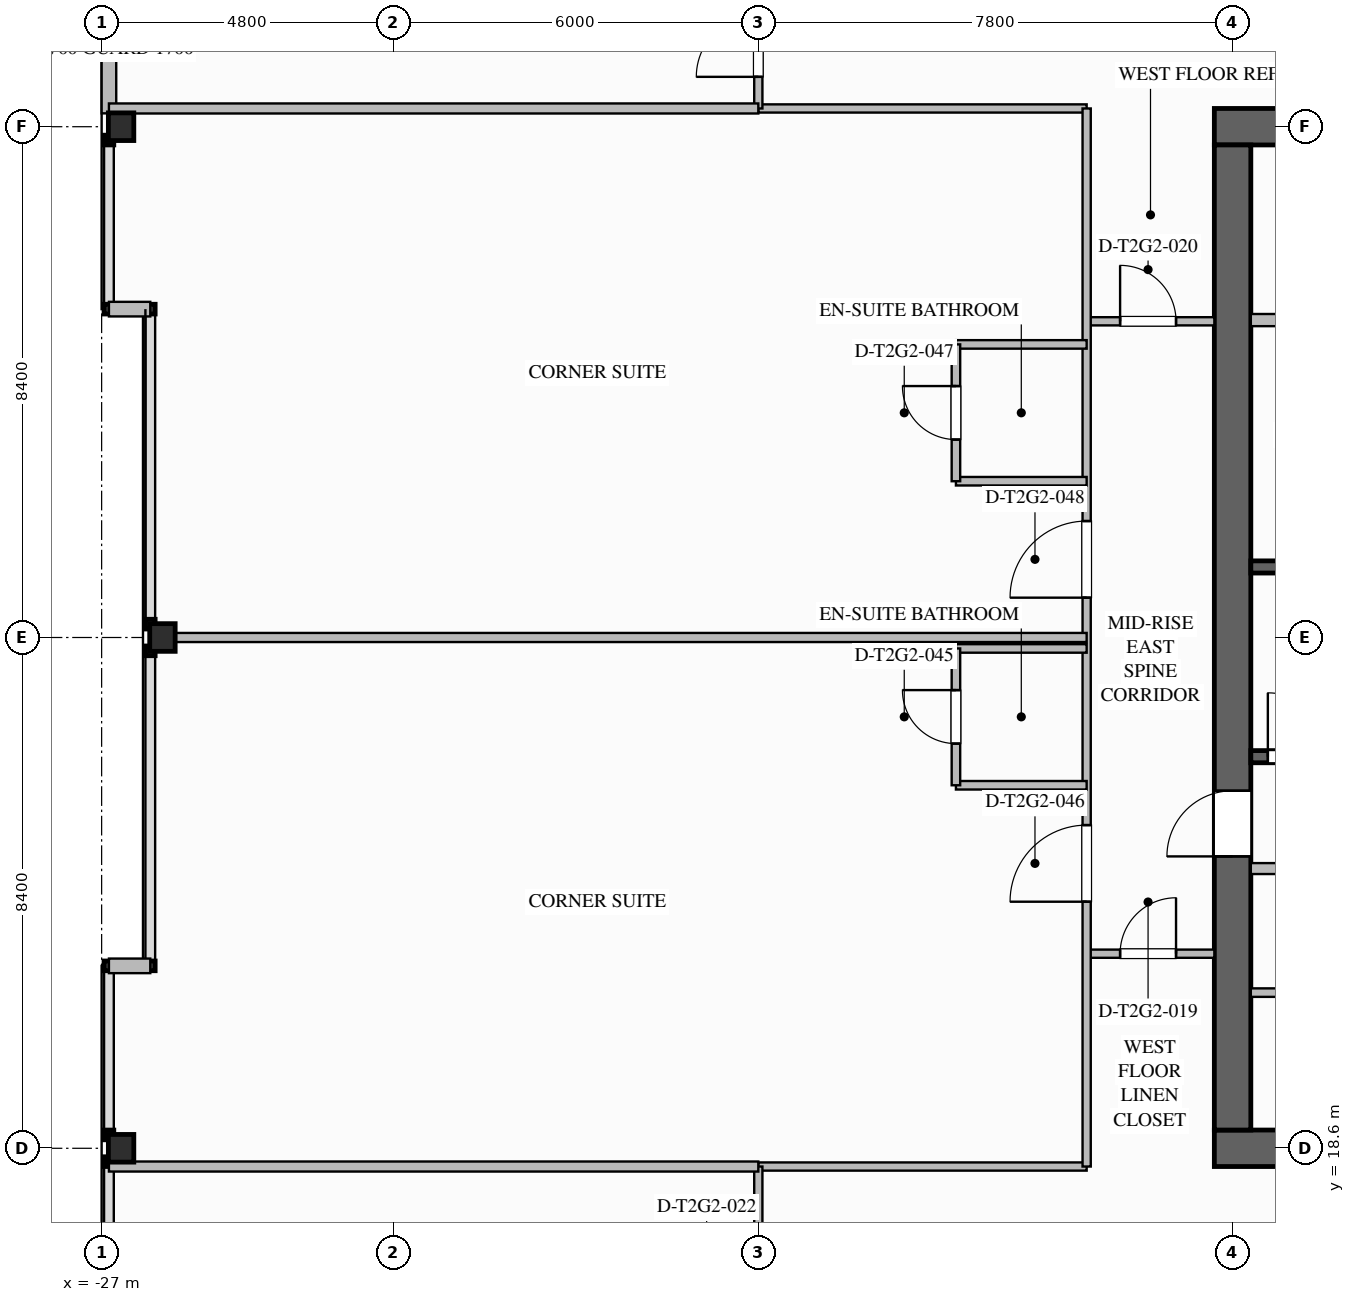
"""IFC4 building model, lengths in metres.
Left out: names, types, materials, properties, quantities, classifications, styles, units other than length and angle.
Written with IfcOpenShell. Run it as: python <this file> out.ifc"""

import sys

from ifc_helpers import new_model, si_unit, direction, frame, frame_2d, origin, origin_2d, place, context, subcontext, project, spatial, rectangle, i_section, extrude, element, fill, save


model = new_model("IFC4")
c1 = context("Model", 3, precision=1e-05, world=origin(), true_north=direction((0.0, 1.0)))
c2 = subcontext(c1, "Body", "Model", "MODEL_VIEW")
j1 = project(units=[si_unit("LENGTHUNIT", "METRE"), si_unit("PLANEANGLEUNIT", "RADIAN")], contexts=[c1])
p1 = place(None, origin())
s1 = spatial("IfcSite", under=j1, at=p1, CompositionType="ELEMENT")
p2 = place(p1, origin())
s2 = spatial("IfcBuilding", under=s1, at=p2, CompositionType="ELEMENT")
p3 = place(p2, frame((0.0, 0.0, 102.3)))
s3 = spatial("IfcBuildingStorey", under=s2, at=p3, CompositionType="ELEMENT", Elevation=102.3)
for number, where, z_axis, x_axis in (
    (1, (-8.7, 35.4, 0.0), (0.0, 0.0, 1.0), (1.0, 0.0, 0.0)),
    (2, (8.7, 18.6, 0.0), (0.0, 0.0, 1.0), (-1.0, 0.0, 0.0)),
):
    element("IfcWall", number, at=place(p3, frame(where, z_axis=z_axis, x_axis=x_axis)), inside=s3, PredefinedType="SHEAR", context=c2, shape_type="SweptSolid", body=[
        extrude(rectangle(XDim=17.4, YDim=0.6, at=frame_2d((8.7, 0.0))), origin(), (0.0, 0.0, 1.0), 3.5),
    ])
p4 = place(p3, frame((-8.4, 18.9, 0.0), z_axis=(0.0, 0.0, 1.0), x_axis=(0.0, 1.0, 0.0)))
e3 = element("IfcWall", 3, at=p4, inside=s3, PredefinedType="SHEAR", context=c2, shape_type="SweptSolid", body=[
    extrude(rectangle(XDim=16.2, YDim=0.6, at=frame_2d((8.1, 0.0))), origin(), (0.0, 0.0, 1.0), 3.5),
])
p5 = place(p4, frame((4.5, 0.0, 0.0)))
e4 = element("IfcOpeningElement", 4, at=p5, cuts=e3, PredefinedType="OPENING", context=c2, shape_type="SweptSolid", body=[
    extrude(rectangle(XDim=1.08, YDim=2.04, at=frame_2d((0.54, 1.02))), frame((0.0, 0.31, 0.0), z_axis=(0.0, -1.0, 0.0), x_axis=(1.0, 0.0, 0.0)), (0.0, 0.0, 1.0), 0.62),
])
for number, where, z_axis, x_axis in (
    (5, (-26.68, 18.6, 0.0), (0.0, 0.0, 1.0), (1.0, 0.0, 0.0)),
    (6, (-26.0, 27.0, 0.0), (0.0, 0.0, 1.0), (1.0, 0.0, 0.0)),
    (7, (-26.68, 35.4, 0.0), (0.0, 0.0, 1.0), (1.0, 0.0, 0.0)),
):
    element("IfcColumn", number, at=place(p3, frame(where, z_axis=z_axis, x_axis=x_axis)), inside=s3, PredefinedType="COLUMN", context=c2, shape_type="SweptSolid", body=[
        extrude(i_section(OverallWidth=0.418, OverallDepth=0.455, WebThickness=0.042, FlangeThickness=0.068, FilletRadius=0.03, at=origin_2d()), origin(), (0.0, 0.0, 1.0), 3.497),
    ])
p6 = place(p3, frame((-26.88, 35.62, 0.0), z_axis=(0.0, 0.0, 1.0), x_axis=(0.0, 1.0, 0.0)))
e8 = element("IfcWall", 8, at=p6, inside=s3, PredefinedType="STANDARD", context=c2, shape_type="SweptSolid", body=[
    extrude(rectangle(XDim=7.361, YDim=0.24, at=frame_2d((3.68, 0.0))), origin(), (0.0, 0.0, 1.0), 2.629),
])
p7 = place(p6, frame((4.58, 0.0, 0.0)))
e9 = element("IfcOpeningElement", 9, at=p7, cuts=e8, PredefinedType="OPENING", context=c2, shape_type="SweptSolid", body=[
    extrude(rectangle(XDim=1.0, YDim=2.2, at=frame_2d((0.5, 1.1))), frame((0.0, 0.13, 0.0), z_axis=(0.0, -1.0, 0.0), x_axis=(1.0, 0.0, 0.0)), (0.0, 0.0, 1.0), 0.26),
])
p8 = place(p6, frame((1.564, 0.0, 0.75)))
e10 = element("IfcOpeningElement", 10, at=p8, cuts=e8, PredefinedType="OPENING", context=c2, shape_type="SweptSolid", body=[
    extrude(rectangle(XDim=1.8, YDim=1.779, at=frame_2d((0.9, 0.89))), frame((0.0, 0.13, 0.0), z_axis=(0.0, -1.0, 0.0), x_axis=(1.0, 0.0, 0.0)), (0.0, 0.0, 1.0), 0.26),
])
for number, where, z_axis, x_axis in (
    (11, (-26.88, 21.6, 0.0), (0.0, 0.0, 1.0), (1.0, 0.0, 0.0)),
    (12, (-26.2, 32.4, 0.0), (0.0, 0.0, 1.0), (-1.0, 0.0, 0.0)),
):
    element("IfcWall", number, at=place(p3, frame(where, z_axis=z_axis, x_axis=x_axis)), inside=s3, PredefinedType="STANDARD", context=c2, shape_type="SweptSolid", body=[
        extrude(rectangle(XDim=0.68, YDim=0.24, at=frame_2d((0.34, 0.0))), origin(), (0.0, 0.0, 1.0), 3.24),
    ])
p9 = place(p3, frame((-8.1, 25.04, 0.0), z_axis=(0.0, 0.0, 1.0), x_axis=(1.0, 0.0, 0.0)))
e13 = element("IfcWall", 13, at=p9, inside=s3, PredefinedType="SOLIDWALL", context=c2, shape_type="SweptSolid", body=[
    extrude(rectangle(XDim=8.1, YDim=0.2, at=frame_2d((4.05, 0.0))), origin(), (0.0, 0.0, 1.0), 3.24),
])
p10 = place(p9, frame((0.28, 0.0, 0.0)))
e14 = element("IfcOpeningElement", 14, at=p10, cuts=e13, PredefinedType="OPENING", context=c2, shape_type="SweptSolid", body=[
    extrude(rectangle(XDim=1.05, YDim=2.1, at=frame_2d((0.525, 1.05))), frame((0.0, 0.11, 0.0), z_axis=(0.0, -1.0, 0.0), x_axis=(1.0, 0.0, 0.0)), (0.0, 0.0, 1.0), 0.22),
])
p11 = place(p3, frame((-8.1, 28.16, 0.0), z_axis=(0.0, 0.0, 1.0), x_axis=(1.0, 0.0, 0.0)))
e15 = element("IfcWall", 15, at=p11, inside=s3, PredefinedType="SOLIDWALL", context=c2, shape_type="SweptSolid", body=[
    extrude(rectangle(XDim=8.1, YDim=0.2, at=frame_2d((4.05, 0.0))), origin(), (0.0, 0.0, 1.0), 3.24),
])
p12 = place(p3, frame((-8.1, 32.22, 0.0), z_axis=(0.0, 0.0, 1.0), x_axis=(1.0, 0.0, 0.0)))
e16 = element("IfcWall", 16, at=p12, inside=s3, PredefinedType="SOLIDWALL", context=c2, shape_type="SweptSolid", body=[
    extrude(rectangle(XDim=7.1, YDim=0.2, at=frame_2d((3.55, 0.0))), origin(), (0.0, 0.0, 1.0), 3.24),
])
p13 = place(p3, frame((-8.1, 23.2, 0.0), z_axis=(0.0, 0.0, 1.0), x_axis=(1.0, 0.0, 0.0)))
e17 = element("IfcWall", 17, at=p13, inside=s3, PredefinedType="SOLIDWALL", context=c2, shape_type="SweptSolid", body=[
    extrude(rectangle(XDim=8.65, YDim=0.18, at=frame_2d((4.325, 0.0))), origin(), (0.0, 0.0, 1.0), 3.24),
])
p14 = place(p13, frame((1.4, 0.0, 0.0)))
e18 = element("IfcOpeningElement", 18, at=p14, cuts=e17, PredefinedType="OPENING", context=c2, shape_type="SweptSolid", body=[
    extrude(rectangle(XDim=1.0, YDim=2.1, at=frame_2d((0.5, 1.05))), frame((0.0, 0.1, 0.0), z_axis=(0.0, -1.0, 0.0), x_axis=(1.0, 0.0, 0.0)), (0.0, 0.0, 1.0), 0.2),
])
p15 = place(p13, frame((5.6, 0.0, 0.0)))
e19 = element("IfcOpeningElement", 19, at=p15, cuts=e17, PredefinedType="OPENING", context=c2, shape_type="SweptSolid", body=[
    extrude(rectangle(XDim=0.92, YDim=2.1, at=frame_2d((0.46, 1.05))), frame((0.0, 0.1, 0.0), z_axis=(0.0, -1.0, 0.0), x_axis=(1.0, 0.0, 0.0)), (0.0, 0.0, 1.0), 0.2),
])
p16 = place(p3, frame((-8.1, 21.16, 0.0), z_axis=(0.0, 0.0, 1.0), x_axis=(1.0, 0.0, 0.0)))
e20 = element("IfcWall", 20, at=p16, inside=s3, PredefinedType="PLUMBINGWALL", context=c2, shape_type="SweptSolid", body=[
    extrude(rectangle(XDim=8.65, YDim=0.14, at=frame_2d((4.325, 0.0))), origin(), (0.0, 0.0, 1.0), 3.24),
])
p17 = place(p16, frame((1.4, 0.0, 0.0)))
e21 = element("IfcOpeningElement", 21, at=p17, cuts=e20, PredefinedType="OPENING", context=c2, shape_type="SweptSolid", body=[
    extrude(rectangle(XDim=0.92, YDim=2.1, at=frame_2d((0.46, 1.05))), frame((0.0, 0.08, 0.0), z_axis=(0.0, -1.0, 0.0), x_axis=(1.0, 0.0, 0.0)), (0.0, 0.0, 1.0), 0.16),
])
p18 = place(p3, frame((-10.8, 21.8, 0.0), z_axis=(0.0, 0.0, 1.0), x_axis=(1.0, 0.0, 0.0)))
e22 = element("IfcWall", 22, at=p18, inside=s3, PredefinedType="PARTITIONING", context=c2, shape_type="SweptSolid", body=[
    extrude(rectangle(XDim=2.1, YDim=0.135, at=frame_2d((1.05, 0.0))), origin(), (0.0, 0.0, 1.0), 3.24),
])
p19 = place(p18, frame((0.55, 0.0, 0.0)))
e23 = element("IfcOpeningElement", 23, at=p19, cuts=e22, PredefinedType="OPENING", context=c2, shape_type="SweptSolid", body=[
    extrude(rectangle(XDim=0.92, YDim=2.1, at=frame_2d((0.46, 1.05))), frame((0.0, 0.077, 0.0), z_axis=(0.0, -1.0, 0.0), x_axis=(1.0, 0.0, 0.0)), (0.0, 0.0, 1.0), 0.155),
])
p20 = place(p3, frame((-10.8, 32.2, 0.0), z_axis=(0.0, 0.0, 1.0), x_axis=(1.0, 0.0, 0.0)))
e24 = element("IfcWall", 24, at=p20, inside=s3, PredefinedType="PARTITIONING", context=c2, shape_type="SweptSolid", body=[
    extrude(rectangle(XDim=2.1, YDim=0.135, at=frame_2d((1.05, 0.0))), origin(), (0.0, 0.0, 1.0), 3.24),
])
p21 = place(p20, frame((0.55, 0.0, 0.0)))
e25 = element("IfcOpeningElement", 25, at=p21, cuts=e24, PredefinedType="OPENING", context=c2, shape_type="SweptSolid", body=[
    extrude(rectangle(XDim=0.92, YDim=2.1, at=frame_2d((0.46, 1.05))), frame((0.0, 0.077, 0.0), z_axis=(0.0, -1.0, 0.0), x_axis=(1.0, 0.0, 0.0)), (0.0, 0.0, 1.0), 0.155),
])
for number, where, z_axis, x_axis in (
    (26, (-16.2, 18.3, 0.0), (0.0, 0.0, 1.0), (1.0, 0.0, 0.0)),
    (27, (-16.2, 35.7, 0.0), (0.0, 0.0, 1.0), (1.0, 0.0, 0.0)),
):
    element("IfcWall", number, at=place(p3, frame(where, z_axis=z_axis, x_axis=x_axis)), inside=s3, PredefinedType="PARTITIONING", context=c2, shape_type="SweptSolid", body=[
        extrude(rectangle(XDim=5.4, YDim=0.135, at=frame_2d((2.7, 0.0))), origin(), (0.0, 0.0, 1.0), 3.24),
    ])
p22 = place(p3, frame((-10.8, 18.3, 0.0), z_axis=(0.0, 0.0, 1.0), x_axis=(0.0, 1.0, 0.0)))
e28 = element("IfcWall", 28, at=p22, inside=s3, PredefinedType="PARTITIONING", context=c2, shape_type="SweptSolid", body=[
    extrude(rectangle(XDim=17.4, YDim=0.135, at=frame_2d((8.7, 0.0))), origin(), (0.0, 0.0, 1.0), 3.24),
])
p23 = place(p22, frame((4.355, 0.0, 0.0)))
e29 = element("IfcOpeningElement", 29, at=p23, cuts=e28, PredefinedType="OPENING", context=c2, shape_type="SweptSolid", body=[
    extrude(rectangle(XDim=1.26, YDim=2.2, at=frame_2d((0.63, 1.1))), frame((0.0, 0.077, 0.0), z_axis=(0.0, -1.0, 0.0), x_axis=(1.0, 0.0, 0.0)), (0.0, 0.0, 1.0), 0.155),
])
p24 = place(p22, frame((9.355, 0.0, 0.0)))
e30 = element("IfcOpeningElement", 30, at=p24, cuts=e28, PredefinedType="OPENING", context=c2, shape_type="SweptSolid", body=[
    extrude(rectangle(XDim=1.26, YDim=2.2, at=frame_2d((0.63, 1.1))), frame((0.0, 0.077, 0.0), z_axis=(0.0, -1.0, 0.0), x_axis=(1.0, 0.0, 0.0)), (0.0, 0.0, 1.0), 0.155),
])
p25 = place(p3, frame((-16.2, 15.6, 0.0), z_axis=(0.0, 0.0, 1.0), x_axis=(0.0, 1.0, 0.0)))
e31 = element("IfcWall", 31, at=p25, inside=s3, PredefinedType="PARTITIONING", context=c2, shape_type="SweptSolid", body=[
    extrude(rectangle(XDim=2.7, YDim=0.135, at=frame_2d((1.35, 0.0))), origin(), (0.0, 0.0, 1.0), 2.452),
])
p26 = place(p25, frame((0.52, 0.0, 0.0)))
e32 = element("IfcOpeningElement", 32, at=p26, cuts=e31, PredefinedType="OPENING", context=c2, shape_type="SweptSolid", body=[
    extrude(rectangle(XDim=1.02, YDim=2.15, at=frame_2d((0.51, 1.075))), frame((0.0, 0.077, 0.0), z_axis=(0.0, -1.0, 0.0), x_axis=(1.0, 0.0, 0.0)), (0.0, 0.0, 1.0), 0.155),
])
p27 = place(p3, frame((-16.2, 35.7, 0.0), z_axis=(0.0, 0.0, 1.0), x_axis=(0.0, 1.0, 0.0)))
e33 = element("IfcWall", 33, at=p27, inside=s3, PredefinedType="PARTITIONING", context=c2, shape_type="SweptSolid", body=[
    extrude(rectangle(XDim=2.1, YDim=0.135, at=frame_2d((1.05, 0.0))), origin(), (0.0, 0.0, 1.0), 2.452),
])
p28 = place(p27, frame((0.52, 0.0, 0.0)))
e34 = element("IfcOpeningElement", 34, at=p28, cuts=e33, PredefinedType="OPENING", context=c2, shape_type="SweptSolid", body=[
    extrude(rectangle(XDim=1.02, YDim=2.15, at=frame_2d((0.51, 1.075))), frame((0.0, 0.077, 0.0), z_axis=(0.0, -1.0, 0.0), x_axis=(1.0, 0.0, 0.0)), (0.0, 0.0, 1.0), 0.155),
])
for number, where, z_axis, x_axis in (
    (35, (-26.88, 18.3, 0.0), (0.0, 0.0, 1.0), (1.0, 0.0, 0.0)),
    (36, (-26.88, 35.7, 0.0), (0.0, 0.0, 1.0), (1.0, 0.0, 0.0)),
):
    element("IfcWall", number, at=place(p3, frame(where, z_axis=z_axis, x_axis=x_axis)), inside=s3, PredefinedType="PARTITIONING", context=c2, shape_type="SweptSolid", body=[
        extrude(rectangle(XDim=10.68, YDim=0.165, at=frame_2d((5.34, 0.0))), origin(), (0.0, 0.0, 1.0), 2.452),
    ])
p29 = place(p3, frame((-26.2, 27.0, 0.0), z_axis=(0.0, 0.0, 1.0), x_axis=(1.0, 0.0, 0.0)))
e37 = element("IfcWall", 37, at=p29, inside=s3, PredefinedType="PARTITIONING", context=c2, shape_type="SweptSolid", body=[
    extrude(rectangle(XDim=15.4, YDim=0.15, at=frame_2d((7.7, 0.0))), origin(), (0.0, 0.0, 1.0), 2.452),
])
p30 = place(p3, frame((-10.8, 24.57, 0.0), z_axis=(0.0, 0.0, 1.0), x_axis=(-1.0, 0.0, 0.0)))
e38 = element("IfcWall", 38, at=p30, inside=s3, PredefinedType="PLUMBINGWALL", context=c2, shape_type="SweptSolid", body=[
    extrude(rectangle(XDim=2.15, YDim=0.14, at=frame_2d((1.075, 0.0))), origin(), (0.0, 0.0, 1.0), 3.24),
])
p31 = place(p3, frame((-10.8, 26.82, 0.0), z_axis=(0.0, 0.0, 1.0), x_axis=(-1.0, 0.0, 0.0)))
e39 = element("IfcWall", 39, at=p31, inside=s3, PredefinedType="PLUMBINGWALL", context=c2, shape_type="SweptSolid", body=[
    extrude(rectangle(XDim=2.15, YDim=0.14, at=frame_2d((1.075, 0.0))), origin(), (0.0, 0.0, 1.0), 2.617),
])
p32 = place(p3, frame((-12.95, 24.57, 0.0), z_axis=(0.0, 0.0, 1.0), x_axis=(0.0, 1.0, 0.0)))
e40 = element("IfcWall", 40, at=p32, inside=s3, PredefinedType="PLUMBINGWALL", context=c2, shape_type="SweptSolid", body=[
    extrude(rectangle(XDim=2.25, YDim=0.14, at=frame_2d((1.125, 0.0))), origin(), (0.0, 0.0, 1.0), 3.24),
])
p33 = place(p32, frame((0.685, 0.0, 0.0)))
e41 = element("IfcOpeningElement", 41, at=p33, cuts=e40, PredefinedType="OPENING", context=c2, shape_type="SweptSolid", body=[
    extrude(rectangle(XDim=0.88, YDim=2.1, at=frame_2d((0.44, 1.05))), frame((0.0, 0.08, 0.0), z_axis=(0.0, -1.0, 0.0), x_axis=(1.0, 0.0, 0.0)), (0.0, 0.0, 1.0), 0.16),
])
for number, where, z_axis, x_axis in (
    (42, (-10.8, 29.57, 0.0), (0.0, 0.0, 1.0), (-1.0, 0.0, 0.0)),
    (43, (-10.8, 31.82, 0.0), (0.0, 0.0, 1.0), (-1.0, 0.0, 0.0)),
):
    element("IfcWall", number, at=place(p3, frame(where, z_axis=z_axis, x_axis=x_axis)), inside=s3, PredefinedType="PLUMBINGWALL", context=c2, shape_type="SweptSolid", body=[
        extrude(rectangle(XDim=2.15, YDim=0.14, at=frame_2d((1.075, 0.0))), origin(), (0.0, 0.0, 1.0), 3.24),
    ])
p34 = place(p3, frame((-12.95, 29.57, 0.0), z_axis=(0.0, 0.0, 1.0), x_axis=(0.0, 1.0, 0.0)))
e44 = element("IfcWall", 44, at=p34, inside=s3, PredefinedType="PLUMBINGWALL", context=c2, shape_type="SweptSolid", body=[
    extrude(rectangle(XDim=2.25, YDim=0.14, at=frame_2d((1.125, 0.0))), origin(), (0.0, 0.0, 1.0), 3.24),
])
p35 = place(p34, frame((0.685, 0.0, 0.0)))
e45 = element("IfcOpeningElement", 45, at=p35, cuts=e44, PredefinedType="OPENING", context=c2, shape_type="SweptSolid", body=[
    extrude(rectangle(XDim=0.88, YDim=2.1, at=frame_2d((0.44, 1.05))), frame((0.0, 0.08, 0.0), z_axis=(0.0, -1.0, 0.0), x_axis=(1.0, 0.0, 0.0)), (0.0, 0.0, 1.0), 0.16),
])
p36 = place(p10, origin())
e46 = element("IfcDoor", 46, at=p36, inside=s3, OperationType="SINGLE_SWING_LEFT", PredefinedType="DOOR", context=c2, shape_type="SweptSolid", body=[
    extrude(rectangle(XDim=1.05, YDim=2.1, at=frame_2d((0.525, 1.05))), frame((0.0, 0.025, 0.0), z_axis=(0.0, -1.0, 0.0), x_axis=(1.0, 0.0, 0.0)), (0.0, 0.0, 1.0), 0.05),
])
fill(e14, e46)
p37 = place(p5, origin())
e47 = element("IfcDoor", 47, at=p37, inside=s3, OperationType="SINGLE_SWING_LEFT", PredefinedType="DOOR", context=c2, shape_type="SweptSolid", body=[
    extrude(rectangle(XDim=1.08, YDim=2.04, at=frame_2d((0.54, 1.02))), frame((0.0, 0.025, 0.0), z_axis=(0.0, -1.0, 0.0), x_axis=(1.0, 0.0, 0.0)), (0.0, 0.0, 1.0), 0.05),
])
fill(e4, e47)
p38 = place(p19, origin())
e48 = element("IfcDoor", 48, at=p38, inside=s3, OperationType="SINGLE_SWING_RIGHT", PredefinedType="DOOR", context=c2, shape_type="SweptSolid", body=[
    extrude(rectangle(XDim=0.92, YDim=2.1, at=frame_2d((0.46, 1.05))), frame((0.0, 0.025, 0.0), z_axis=(0.0, -1.0, 0.0), x_axis=(1.0, 0.0, 0.0)), (0.0, 0.0, 1.0), 0.05),
])
fill(e23, e48)
p39 = place(p21, origin())
e49 = element("IfcDoor", 49, at=p39, inside=s3, OperationType="SINGLE_SWING_LEFT", PredefinedType="DOOR", context=c2, shape_type="SweptSolid", body=[
    extrude(rectangle(XDim=0.92, YDim=2.1, at=frame_2d((0.46, 1.05))), frame((0.0, 0.025, 0.0), z_axis=(0.0, -1.0, 0.0), x_axis=(1.0, 0.0, 0.0)), (0.0, 0.0, 1.0), 0.05),
])
fill(e25, e49)
p40 = place(p28, origin())
e50 = element("IfcDoor", 50, at=p40, inside=s3, OperationType="SINGLE_SWING_LEFT", PredefinedType="DOOR", context=c2, shape_type="SweptSolid", body=[
    extrude(rectangle(XDim=1.02, YDim=2.15, at=frame_2d((0.51, 1.075))), frame((0.0, 0.025, 0.0), z_axis=(0.0, -1.0, 0.0), x_axis=(1.0, 0.0, 0.0)), (0.0, 0.0, 1.0), 0.05),
])
fill(e34, e50)
p41 = place(p33, origin())
e51 = element("IfcDoor", 51, at=p41, inside=s3, OperationType="SINGLE_SWING_RIGHT", PredefinedType="DOOR", context=c2, shape_type="SweptSolid", body=[
    extrude(rectangle(XDim=0.88, YDim=2.1, at=frame_2d((0.44, 1.05))), frame((0.0, 0.025, 0.0), z_axis=(0.0, -1.0, 0.0), x_axis=(1.0, 0.0, 0.0)), (0.0, 0.0, 1.0), 0.05),
])
fill(e41, e51)
p42 = place(p23, origin())
e52 = element("IfcDoor", 52, at=p42, inside=s3, OperationType="SINGLE_SWING_LEFT", PredefinedType="DOOR", context=c2, shape_type="SweptSolid", body=[
    extrude(rectangle(XDim=1.26, YDim=2.2, at=frame_2d((0.63, 1.1))), frame((0.0, 0.025, 0.0), z_axis=(0.0, -1.0, 0.0), x_axis=(1.0, 0.0, 0.0)), (0.0, 0.0, 1.0), 0.05),
])
fill(e29, e52)
p43 = place(p35, origin())
e53 = element("IfcDoor", 53, at=p43, inside=s3, OperationType="SINGLE_SWING_RIGHT", PredefinedType="DOOR", context=c2, shape_type="SweptSolid", body=[
    extrude(rectangle(XDim=0.88, YDim=2.1, at=frame_2d((0.44, 1.05))), frame((0.0, 0.025, 0.0), z_axis=(0.0, -1.0, 0.0), x_axis=(1.0, 0.0, 0.0)), (0.0, 0.0, 1.0), 0.05),
])
fill(e45, e53)
p44 = place(p24, origin())
e54 = element("IfcDoor", 54, at=p44, inside=s3, OperationType="SINGLE_SWING_LEFT", PredefinedType="DOOR", context=c2, shape_type="SweptSolid", body=[
    extrude(rectangle(XDim=1.26, YDim=2.2, at=frame_2d((0.63, 1.1))), frame((0.0, 0.025, 0.0), z_axis=(0.0, -1.0, 0.0), x_axis=(1.0, 0.0, 0.0)), (0.0, 0.0, 1.0), 0.05),
])
fill(e30, e54)
save(model, sys.argv[1])
